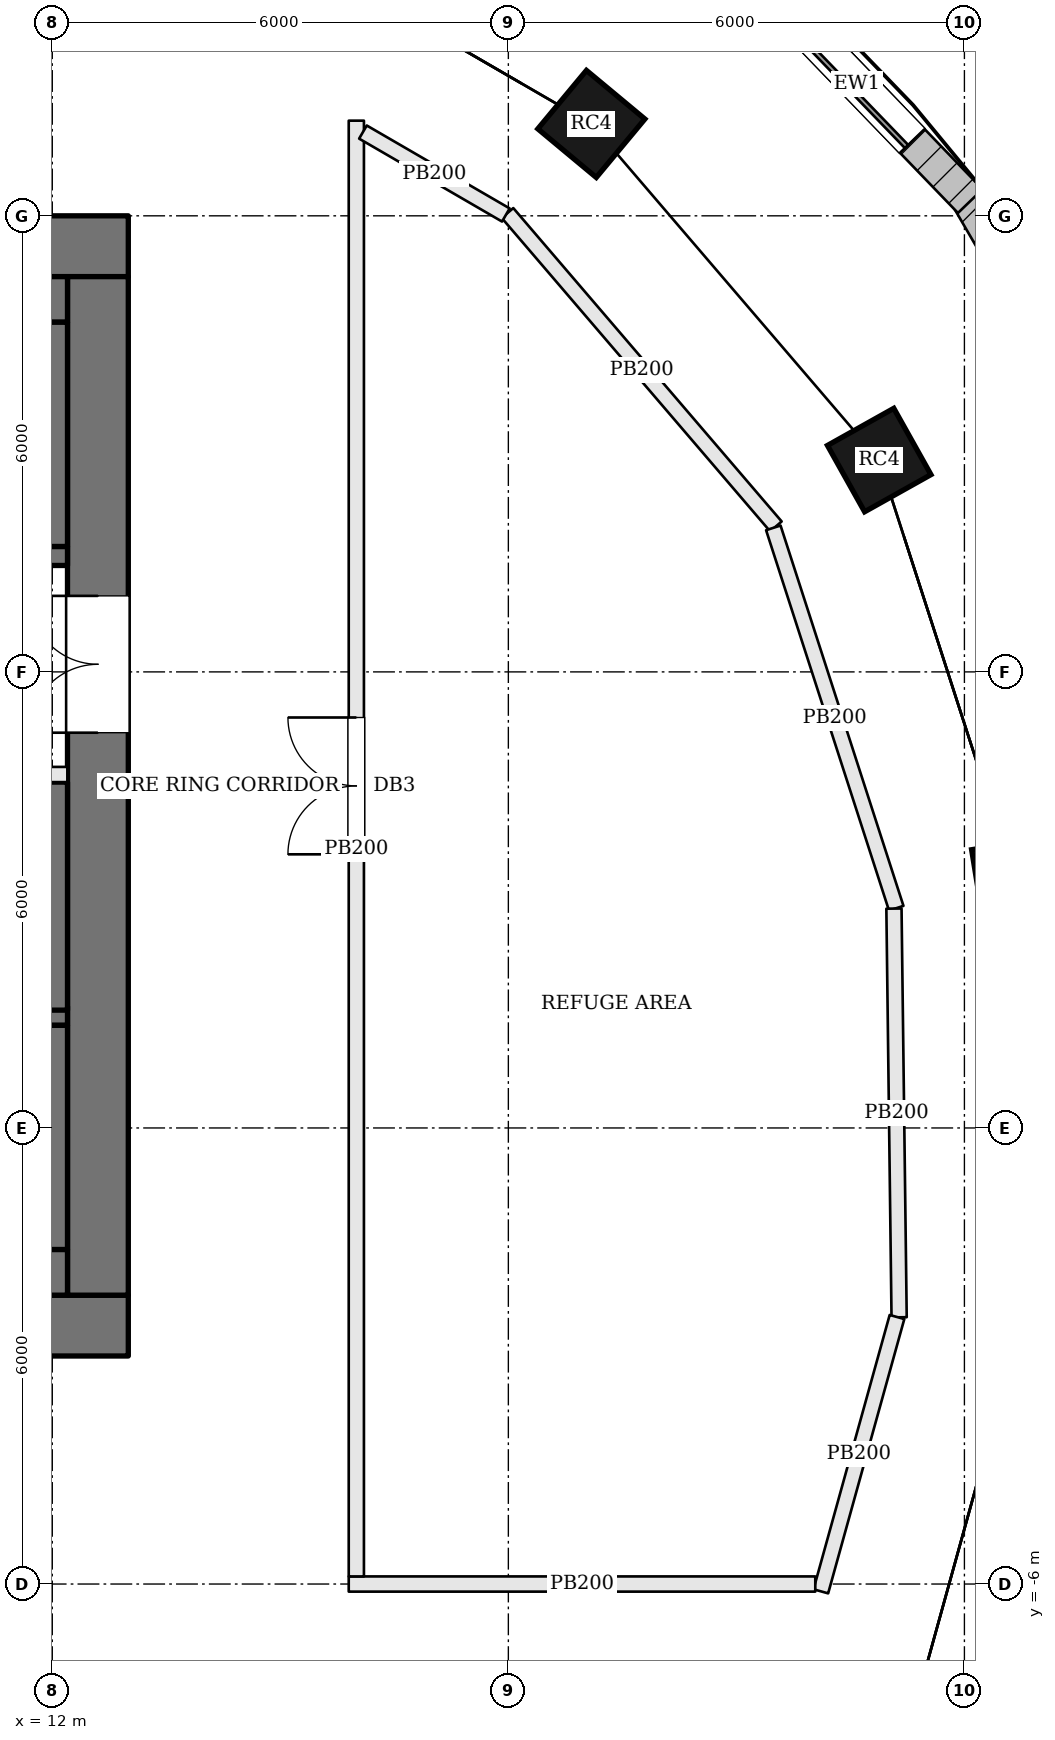
"""IFC4 building model, lengths in metres.
Left out: names, types, materials, properties, quantities, classifications, styles, units other than length and angle.
Written with IfcOpenShell. Run it as: python <this file> out.ifc"""

import sys

from ifc_helpers import new_model, si_unit, direction, frame, frame_2d, origin, origin_2d, place, context, subcontext, project, spatial, rectangle, extrude, element, fill, save


model = new_model("IFC4")
c1 = context("Model", 3, precision=1e-05, world=origin(), true_north=direction((0.0, 1.0)))
c2 = subcontext(c1, "Body", "Model", "MODEL_VIEW")
j1 = project(units=[si_unit("LENGTHUNIT", "METRE"), si_unit("PLANEANGLEUNIT", "RADIAN")], contexts=[c1])
p1 = place(None, origin())
s1 = spatial("IfcSite", under=j1, at=p1, CompositionType="ELEMENT")
p2 = place(p1, origin())
s2 = spatial("IfcBuilding", under=s1, at=p2, CompositionType="ELEMENT")
p3 = place(p2, frame((0.0, 0.0, 216.9)))
s3 = spatial("IfcBuildingStorey", under=s2, at=p3, CompositionType="ELEMENT", Elevation=216.9)
p4 = place(p3, frame((-13.0, 11.6, 0.0), z_axis=(0.0, 0.0, 1.0), x_axis=(1.0, 0.0, 0.0)))
e1 = element("IfcWall", 1, at=p4, inside=s3, PredefinedType="SHEAR", context=c2, shape_type="SweptSolid", body=[
    extrude(rectangle(XDim=26.0, YDim=0.8, at=frame_2d((13.0, 0.0))), origin(), (0.0, 0.0, 1.0), 4.5),
])
p5 = place(p4, frame((8.975, 0.0, 0.0)))
e2 = element("IfcOpeningElement", 2, at=p5, cuts=e1, PredefinedType="OPENING", context=c2, shape_type="SweptSolid", body=[
    extrude(rectangle(XDim=0.7, YDim=2.1, at=frame_2d((0.35, 1.05))), frame((0.0, 0.41, 0.0), z_axis=(0.0, -1.0, 0.0), x_axis=(1.0, 0.0, 0.0)), (0.0, 0.0, 1.0), 0.82),
])
p6 = place(p4, frame((11.575, 0.0, 0.0)))
e3 = element("IfcOpeningElement", 3, at=p6, cuts=e1, PredefinedType="OPENING", context=c2, shape_type="SweptSolid", body=[
    extrude(rectangle(XDim=1.2, YDim=2.1, at=frame_2d((0.6, 1.05))), frame((0.0, 0.41, 0.0), z_axis=(0.0, -1.0, 0.0), x_axis=(1.0, 0.0, 0.0)), (0.0, 0.0, 1.0), 0.82),
])
p7 = place(p4, frame((14.675, 0.0, 0.0)))
e4 = element("IfcOpeningElement", 4, at=p7, cuts=e1, PredefinedType="OPENING", context=c2, shape_type="SweptSolid", body=[
    extrude(rectangle(XDim=0.7, YDim=2.1, at=frame_2d((0.35, 1.05))), frame((0.0, 0.41, 0.0), z_axis=(0.0, -1.0, 0.0), x_axis=(1.0, 0.0, 0.0)), (0.0, 0.0, 1.0), 0.82),
])
p8 = place(p4, frame((16.725, 0.0, 0.0)))
e5 = element("IfcOpeningElement", 5, at=p8, cuts=e1, PredefinedType="OPENING", context=c2, shape_type="SweptSolid", body=[
    extrude(rectangle(XDim=0.7, YDim=2.1, at=frame_2d((0.35, 1.05))), frame((0.0, 0.41, 0.0), z_axis=(0.0, -1.0, 0.0), x_axis=(1.0, 0.0, 0.0)), (0.0, 0.0, 1.0), 0.82),
])
p9 = place(p4, frame((6.88, 0.0, 0.0)))
e6 = element("IfcOpeningElement", 6, at=p9, cuts=e1, PredefinedType="OPENING", context=c2, shape_type="SweptSolid", body=[
    extrude(rectangle(XDim=1.0, YDim=2.1, at=frame_2d((0.5, 1.05))), frame((0.0, 0.41, 0.0), z_axis=(0.0, -1.0, 0.0), x_axis=(1.0, 0.0, 0.0)), (0.0, 0.0, 1.0), 0.82),
])
p10 = place(p4, frame((18.12, 0.0, 0.0)))
e7 = element("IfcOpeningElement", 7, at=p10, cuts=e1, PredefinedType="OPENING", context=c2, shape_type="SweptSolid", body=[
    extrude(rectangle(XDim=1.0, YDim=2.1, at=frame_2d((0.5, 1.05))), frame((0.0, 0.41, 0.0), z_axis=(0.0, -1.0, 0.0), x_axis=(1.0, 0.0, 0.0)), (0.0, 0.0, 1.0), 0.82),
])
p11 = place(p3, frame((-13.0, -2.6, 0.0), z_axis=(0.0, 0.0, 1.0), x_axis=(1.0, 0.0, 0.0)))
e8 = element("IfcWall", 8, at=p11, inside=s3, PredefinedType="SHEAR", context=c2, shape_type="SweptSolid", body=[
    extrude(rectangle(XDim=26.0, YDim=0.8, at=frame_2d((13.0, 0.0))), origin(), (0.0, 0.0, 1.0), 4.5),
])
p12 = place(p11, frame((9.125, 0.0, 0.0)))
e9 = element("IfcOpeningElement", 9, at=p12, cuts=e8, PredefinedType="OPENING", context=c2, shape_type="SweptSolid", body=[
    extrude(rectangle(XDim=1.2, YDim=2.1, at=frame_2d((0.6, 1.05))), frame((0.0, 0.41, 0.0), z_axis=(0.0, -1.0, 0.0), x_axis=(1.0, 0.0, 0.0)), (0.0, 0.0, 1.0), 0.82),
])
p13 = place(p11, frame((12.375, 0.0, 0.0)))
e10 = element("IfcOpeningElement", 10, at=p13, cuts=e8, PredefinedType="OPENING", context=c2, shape_type="SweptSolid", body=[
    extrude(rectangle(XDim=1.2, YDim=2.1, at=frame_2d((0.6, 1.05))), frame((0.0, 0.41, 0.0), z_axis=(0.0, -1.0, 0.0), x_axis=(1.0, 0.0, 0.0)), (0.0, 0.0, 1.0), 0.82),
])
p14 = place(p11, frame((15.65, 0.0, 0.0)))
e11 = element("IfcOpeningElement", 11, at=p14, cuts=e8, PredefinedType="OPENING", context=c2, shape_type="SweptSolid", body=[
    extrude(rectangle(XDim=1.2, YDim=2.1, at=frame_2d((0.6, 1.05))), frame((0.0, 0.41, 0.0), z_axis=(0.0, -1.0, 0.0), x_axis=(1.0, 0.0, 0.0)), (0.0, 0.0, 1.0), 0.82),
])
p15 = place(p11, frame((6.88, 0.0, 0.0)))
e12 = element("IfcOpeningElement", 12, at=p15, cuts=e8, PredefinedType="OPENING", context=c2, shape_type="SweptSolid", body=[
    extrude(rectangle(XDim=1.0, YDim=2.1, at=frame_2d((0.5, 1.05))), frame((0.0, 0.41, 0.0), z_axis=(0.0, -1.0, 0.0), x_axis=(1.0, 0.0, 0.0)), (0.0, 0.0, 1.0), 0.82),
])
p16 = place(p11, frame((18.12, 0.0, 0.0)))
e13 = element("IfcOpeningElement", 13, at=p16, cuts=e8, PredefinedType="OPENING", context=c2, shape_type="SweptSolid", body=[
    extrude(rectangle(XDim=1.0, YDim=2.1, at=frame_2d((0.5, 1.05))), frame((0.0, 0.41, 0.0), z_axis=(0.0, -1.0, 0.0), x_axis=(1.0, 0.0, 0.0)), (0.0, 0.0, 1.0), 0.82),
])
p17 = place(p3, frame((12.6, -2.2, 0.0), z_axis=(0.0, 0.0, 1.0), x_axis=(0.0, 1.0, 0.0)))
e14 = element("IfcWall", 14, at=p17, inside=s3, PredefinedType="SHEAR", context=c2, shape_type="SweptSolid", body=[
    extrude(rectangle(XDim=13.4, YDim=0.8, at=frame_2d((6.7, 0.0))), origin(), (0.0, 0.0, 1.0), 4.5),
])
p18 = place(p17, frame((7.4, 0.0, 0.0)))
e15 = element("IfcOpeningElement", 15, at=p18, cuts=e14, PredefinedType="OPENING", context=c2, shape_type="SweptSolid", body=[
    extrude(rectangle(XDim=1.8, YDim=2.1, at=frame_2d((0.9, 1.05))), frame((0.0, 0.41, 0.0), z_axis=(0.0, -1.0, 0.0), x_axis=(1.0, 0.0, 0.0)), (0.0, 0.0, 1.0), 0.82),
])
for number, where, z_axis, x_axis in (
    (16, (24.669, 3.248, 0.0), (0.0, 0.0, 1.0), (-0.162, 0.987, 0.0)),
    (17, (22.879, 8.787, 0.0), (0.0, 0.0, 1.0), (-0.489, 0.873, 0.0)),
    (18, (19.092, 13.209, 0.0), (0.0, 0.0, 1.0), (-0.769, 0.639, 0.0)),
):
    element("IfcColumn", number, at=place(p3, frame(where, z_axis=z_axis, x_axis=x_axis)), inside=s3, PredefinedType="COLUMN", context=c2, shape_type="SweptSolid", body=[
        extrude(rectangle(XDim=1.0, YDim=1.0, at=origin_2d()), origin(), (0.0, 0.0, 1.0), 4.5),
    ])
p19 = place(p3, frame((26.23, 8.473, 0.0), z_axis=(0.0, 0.0, 1.0), x_axis=(-0.502203169453, 0.864749661227, 0.0)))
e19 = element("IfcWall", 19, at=p19, inside=s3, PredefinedType="SOLIDWALL", context=c2, shape_type="SweptSolid", body=[
    extrude(rectangle(XDim=4.353, YDim=0.45, at=frame_2d((2.176, 0.0))), origin(), (0.0, 0.0, 1.0), 4.3),
])
p20 = place(p19, frame((1.126, 0.0, 1.2)))
e20 = element("IfcOpeningElement", 20, at=p20, cuts=e19, PredefinedType="OPENING", context=c2, shape_type="SweptSolid", body=[
    extrude(rectangle(XDim=2.1, YDim=1.8, at=frame_2d((1.05, 0.9))), frame((0.0, 0.235, 0.0), z_axis=(0.0, -1.0, 0.0), x_axis=(1.0, 0.0, 0.0)), (0.0, 0.0, 1.0), 0.47),
])
p21 = place(p3, frame((24.077, 12.194, 0.0), z_axis=(0.0, 0.0, 1.0), x_axis=(-0.69406513137, 0.719912212298, 0.0)))
e21 = element("IfcWall", 21, at=p21, inside=s3, PredefinedType="SOLIDWALL", context=c2, shape_type="SweptSolid", body=[
    extrude(rectangle(XDim=4.298, YDim=0.45, at=frame_2d((2.149, 0.0))), origin(), (0.0, 0.0, 1.0), 4.3),
])
p22 = place(p21, frame((1.099, 0.0, 1.2)))
e22 = element("IfcOpeningElement", 22, at=p22, cuts=e21, PredefinedType="OPENING", context=c2, shape_type="SweptSolid", body=[
    extrude(rectangle(XDim=2.1, YDim=1.8, at=frame_2d((1.05, 0.9))), frame((0.0, 0.235, 0.0), z_axis=(0.0, -1.0, 0.0), x_axis=(1.0, 0.0, 0.0)), (0.0, 0.0, 1.0), 0.47),
])
p23 = place(p3, frame((23.098, 13.318, 4.5), z_axis=(0.0, 0.0, 1.0), x_axis=(-0.694058269721, 0.71991882753, 0.0)))
e23 = element("IfcWall", 23, at=p23, inside=s3, PredefinedType="PARAPET", context=c2, shape_type="SweptSolid", body=[
    extrude(rectangle(XDim=2.747, YDim=0.3, at=frame_2d((1.374, 0.0))), origin(), (0.0, 0.0, 1.0), 1.1),
])
p24 = place(p3, frame((12.2, 7.525, 0.0), z_axis=(0.0, 0.0, 1.0), x_axis=(-1.0, 0.0, 0.0)))
e24 = element("IfcWall", 24, at=p24, inside=s3, PredefinedType="SOLIDWALL", context=c2, shape_type="SweptSolid", body=[
    extrude(rectangle(XDim=7.1, YDim=0.25, at=frame_2d((3.55, 0.0))), origin(), (0.0, 0.0, 1.0), 4.3),
])
p25 = place(p24, frame((5.8, 0.0, 0.0)))
e25 = element("IfcOpeningElement", 25, at=p25, cuts=e24, PredefinedType="OPENING", context=c2, shape_type="SweptSolid", body=[
    extrude(rectangle(XDim=1.2, YDim=2.1, at=frame_2d((0.6, 1.05))), frame((0.0, 0.135, 0.0), z_axis=(0.0, -1.0, 0.0), x_axis=(1.0, 0.0, 0.0)), (0.0, 0.0, 1.0), 0.27),
])
p26 = place(p3, frame((12.2, 4.65, 0.0), z_axis=(0.0, 0.0, 1.0), x_axis=(-1.0, 0.0, 0.0)))
e26 = element("IfcWall", 26, at=p26, inside=s3, PredefinedType="SOLIDWALL", context=c2, shape_type="SweptSolid", body=[
    extrude(rectangle(XDim=7.1, YDim=0.2, at=frame_2d((3.55, 0.0))), origin(), (0.0, 0.0, 1.0), 4.3),
])
p27 = place(p26, frame((4.4, 0.0, 0.0)))
e27 = element("IfcOpeningElement", 27, at=p27, cuts=e26, PredefinedType="OPENING", context=c2, shape_type="SweptSolid", body=[
    extrude(rectangle(XDim=1.2, YDim=2.1, at=frame_2d((0.6, 1.05))), frame((0.0, 0.11, 0.0), z_axis=(0.0, -1.0, 0.0), x_axis=(1.0, 0.0, 0.0)), (0.0, 0.0, 1.0), 0.22),
])
p28 = place(p26, frame((1.1, 0.0, 0.0)))
e28 = element("IfcOpeningElement", 28, at=p28, cuts=e26, PredefinedType="OPENING", context=c2, shape_type="SweptSolid", body=[
    extrude(rectangle(XDim=1.2, YDim=2.1, at=frame_2d((0.6, 1.05))), frame((0.0, 0.11, 0.0), z_axis=(0.0, -1.0, 0.0), x_axis=(1.0, 0.0, 0.0)), (0.0, 0.0, 1.0), 0.22),
])
p29 = place(p3, frame((12.2, 1.475, 0.0), z_axis=(0.0, 0.0, 1.0), x_axis=(-1.0, 0.0, 0.0)))
e29 = element("IfcWall", 29, at=p29, inside=s3, PredefinedType="SOLIDWALL", context=c2, shape_type="SweptSolid", body=[
    extrude(rectangle(XDim=7.1, YDim=0.25, at=frame_2d((3.55, 0.0))), origin(), (0.0, 0.0, 1.0), 4.3),
])
p30 = place(p29, frame((5.8, 0.0, 0.0)))
e30 = element("IfcOpeningElement", 30, at=p30, cuts=e29, PredefinedType="OPENING", context=c2, shape_type="SweptSolid", body=[
    extrude(rectangle(XDim=1.2, YDim=2.1, at=frame_2d((0.6, 1.05))), frame((0.0, 0.135, 0.0), z_axis=(0.0, -1.0, 0.0), x_axis=(1.0, 0.0, 0.0)), (0.0, 0.0, 1.0), 0.27),
])
p31 = place(p3, frame((12.2, 10.9, 0.0), z_axis=(0.0, 0.0, 1.0), x_axis=(-1.0, 0.0, 0.0)))
e31 = element("IfcWall", 31, at=p31, inside=s3, PredefinedType="SOLIDWALL", context=c2, shape_type="SweptSolid", body=[
    extrude(rectangle(XDim=6.08, YDim=0.6, at=frame_2d((3.04, 0.0))), origin(), (0.0, 0.0, 1.0), 4.3),
])
p32 = place(p3, frame((11.9, 10.6, 0.0), z_axis=(0.0, 0.0, 1.0), x_axis=(0.0, -1.0, 0.0)))
e32 = element("IfcWall", 32, at=p32, inside=s3, PredefinedType="SOLIDWALL", context=c2, shape_type="SweptSolid", body=[
    extrude(rectangle(XDim=2.95, YDim=0.6, at=frame_2d((1.475, 0.0))), origin(), (0.0, 0.0, 1.0), 4.3),
])
p33 = place(p3, frame((11.9, 4.55, 0.0), z_axis=(0.0, 0.0, 1.0), x_axis=(0.0, -1.0, 0.0)))
e33 = element("IfcWall", 33, at=p33, inside=s3, PredefinedType="SOLIDWALL", context=c2, shape_type="SweptSolid", body=[
    extrude(rectangle(XDim=3.0, YDim=0.6, at=frame_2d((1.5, 0.0))), origin(), (0.0, 0.0, 1.0), 4.3),
])
p34 = place(p3, frame((11.9, 1.35, 0.0), z_axis=(0.0, 0.0, 1.0), x_axis=(0.0, -1.0, 0.0)))
e34 = element("IfcWall", 34, at=p34, inside=s3, PredefinedType="SOLIDWALL", context=c2, shape_type="SweptSolid", body=[
    extrude(rectangle(XDim=2.95, YDim=0.6, at=frame_2d((1.475, 0.0))), origin(), (0.0, 0.0, 1.0), 4.3),
])
p35 = place(p3, frame((12.2, -1.9, 0.0), z_axis=(0.0, 0.0, 1.0), x_axis=(-1.0, 0.0, 0.0)))
e35 = element("IfcWall", 35, at=p35, inside=s3, PredefinedType="SOLIDWALL", context=c2, shape_type="SweptSolid", body=[
    extrude(rectangle(XDim=6.08, YDim=0.6, at=frame_2d((3.04, 0.0))), origin(), (0.0, 0.0, 1.0), 4.3),
])
p36 = place(p3, frame((17.989, 12.037, 0.0), z_axis=(0.0, 0.0, 1.0), x_axis=(0.65046908435, -0.759532731556, 0.0)))
e36 = element("IfcWall", 36, at=p36, inside=s3, PredefinedType="PARTITIONING", context=c2, shape_type="SweptSolid", body=[
    extrude(rectangle(XDim=5.428, YDim=0.2, at=frame_2d((2.714, 0.0))), origin(), (0.0, 0.0, 1.0), 4.3),
])
p37 = place(p3, frame((21.486, 7.895, 0.0), z_axis=(0.0, 0.0, 1.0), x_axis=(0.307481575482, -0.951554034587, 0.0)))
e37 = element("IfcWall", 37, at=p37, inside=s3, PredefinedType="PARTITIONING", context=c2, shape_type="SweptSolid", body=[
    extrude(rectangle(XDim=5.259, YDim=0.2, at=frame_2d((2.629, 0.0))), origin(), (0.0, 0.0, 1.0), 4.3),
])
p38 = place(p3, frame((23.073, 2.886, 0.0), z_axis=(0.0, 0.0, 1.0), x_axis=(0.012666982201, -0.999919770563, 0.0)))
e38 = element("IfcWall", 38, at=p38, inside=s3, PredefinedType="PARTITIONING", context=c2, shape_type="SweptSolid", body=[
    extrude(rectangle(XDim=5.377, YDim=0.2, at=frame_2d((2.689, 0.0))), origin(), (0.0, 0.0, 1.0), 4.3),
])
p39 = place(p3, frame((23.113, -2.487, 0.0), z_axis=(0.0, 0.0, 1.0), x_axis=(-0.2675161078, -0.963553388281, 0.0)))
e39 = element("IfcWall", 39, at=p39, inside=s3, PredefinedType="PARTITIONING", context=c2, shape_type="SweptSolid", body=[
    extrude(rectangle(XDim=3.745, YDim=0.2, at=frame_2d((1.873, 0.0))), origin(), (0.0, 0.0, 1.0), 4.3),
])
p40 = place(p3, frame((22.038, -6.0, 0.0), z_axis=(0.0, 0.0, 1.0), x_axis=(-1.0, 0.0, 0.0)))
e40 = element("IfcWall", 40, at=p40, inside=s3, PredefinedType="PARTITIONING", context=c2, shape_type="SweptSolid", body=[
    extrude(rectangle(XDim=6.138, YDim=0.2, at=frame_2d((3.069, 0.0))), origin(), (0.0, 0.0, 1.0), 4.3),
])
p41 = place(p3, frame((16.0, -5.9, 0.0), z_axis=(0.0, 0.0, 1.0), x_axis=(0.0, 1.0, 0.0)))
e41 = element("IfcWall", 41, at=p41, inside=s3, PredefinedType="PARTITIONING", context=c2, shape_type="SweptSolid", body=[
    extrude(rectangle(XDim=19.152, YDim=0.2, at=frame_2d((9.576, 0.0))), origin(), (0.0, 0.0, 1.0), 4.3),
])
p42 = place(p41, frame((9.5, 0.0, 0.0)))
e42 = element("IfcOpeningElement", 42, at=p42, cuts=e41, PredefinedType="OPENING", context=c2, shape_type="SweptSolid", body=[
    extrude(rectangle(XDim=1.8, YDim=2.1, at=frame_2d((0.9, 1.05))), frame((0.0, 0.11, 0.0), z_axis=(0.0, -1.0, 0.0), x_axis=(1.0, 0.0, 0.0)), (0.0, 0.0, 1.0), 0.22),
])
p43 = place(p3, frame((16.087, 13.102, 0.0), z_axis=(0.0, 0.0, 1.0), x_axis=(0.864913206024, -0.50192145406, 0.0)))
e43 = element("IfcWall", 43, at=p43, inside=s3, PredefinedType="PARTITIONING", context=c2, shape_type="SweptSolid", body=[
    extrude(rectangle(XDim=2.174, YDim=0.2, at=frame_2d((1.087, 0.0))), origin(), (0.0, 0.0, 1.0), 4.3),
])
p44 = place(p22, origin())
e44 = element("IfcWindow", 44, at=p44, inside=s3, PartitioningType="SINGLE_PANEL", PredefinedType="WINDOW", context=c2, shape_type="SweptSolid", body=[
    extrude(rectangle(XDim=2.1, YDim=1.8, at=frame_2d((1.05, 0.9))), frame((0.0, 0.135, 0.0), z_axis=(0.0, -1.0, 0.0), x_axis=(1.0, 0.0, 0.0)), (0.0, 0.0, 1.0), 0.06),
])
fill(e22, e44)
p45 = place(p18, origin())
e45 = element("IfcDoor", 45, at=p45, inside=s3, OperationType="DOUBLE_DOOR_SINGLE_SWING", PredefinedType="DOOR", context=c2, shape_type="SweptSolid", body=[
    extrude(rectangle(XDim=1.8, YDim=2.1, at=frame_2d((0.9, 1.05))), frame((0.0, 0.025, 0.0), z_axis=(0.0, -1.0, 0.0), x_axis=(1.0, 0.0, 0.0)), (0.0, 0.0, 1.0), 0.05),
])
fill(e15, e45)
p46 = place(p42, origin())
e46 = element("IfcDoor", 46, at=p46, inside=s3, OperationType="DOUBLE_DOOR_SINGLE_SWING", PredefinedType="DOOR", context=c2, shape_type="SweptSolid", body=[
    extrude(rectangle(XDim=1.8, YDim=2.1, at=frame_2d((0.9, 1.05))), frame((0.0, 0.025, 0.0), z_axis=(0.0, -1.0, 0.0), x_axis=(1.0, 0.0, 0.0)), (0.0, 0.0, 1.0), 0.05),
])
fill(e42, e46)
save(model, sys.argv[1])
